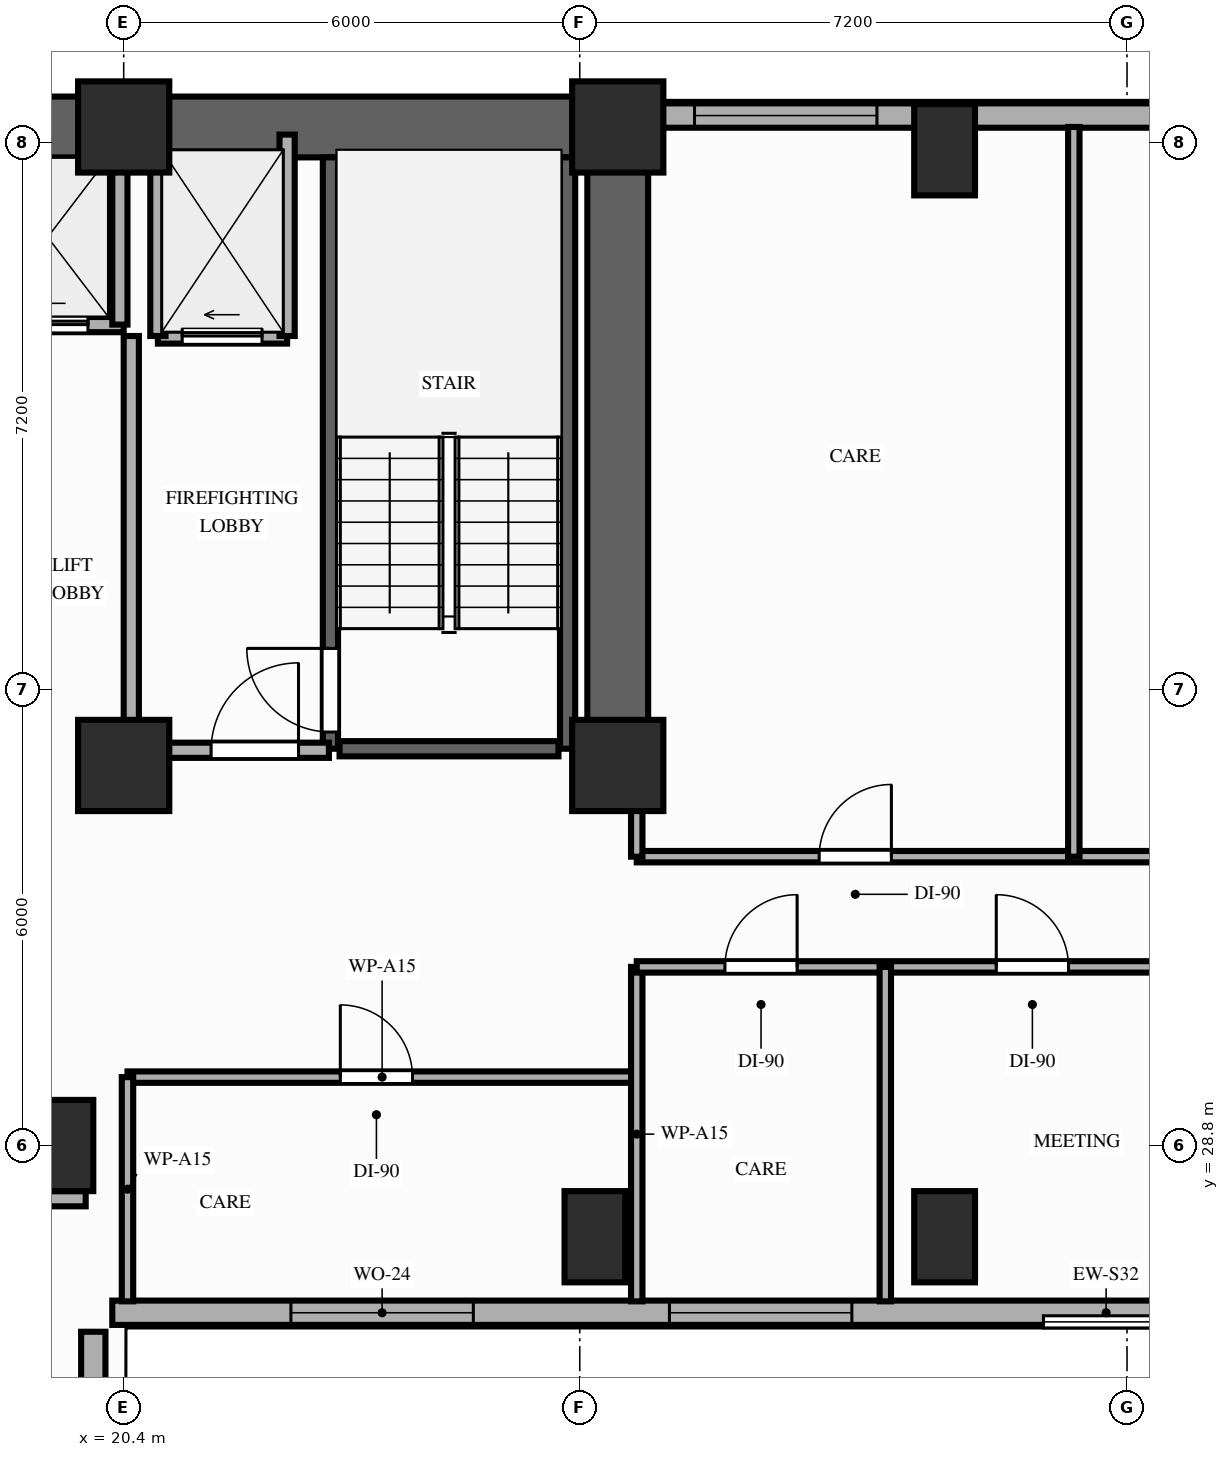
"""IFC4 building model, lengths in metres.
Left out: names, types, materials, properties, quantities, classifications, styles, units other than length and angle.
Written with IfcOpenShell. Run it as: python <this file> out.ifc"""

import sys

from ifc_helpers import new_model, si_unit, direction, frame, frame_2d, origin, origin_2d, place, context, subcontext, project, spatial, rectangle, extrude, element, fill, save


model = new_model("IFC4")
c1 = context("Model", 3, precision=1e-05, world=origin(), true_north=direction((0.0, 1.0)))
c2 = subcontext(c1, "Body", "Model", "MODEL_VIEW")
j1 = project(units=[si_unit("LENGTHUNIT", "METRE"), si_unit("PLANEANGLEUNIT", "RADIAN")], contexts=[c1])
p1 = place(None, origin())
s1 = spatial("IfcSite", under=j1, at=p1, CompositionType="ELEMENT")
p2 = place(p1, origin())
s2 = spatial("IfcBuilding", under=s1, at=p2, CompositionType="ELEMENT")
p3 = place(p2, frame((0.0, 0.0, 72.4)))
s3 = spatial("IfcBuildingStorey", under=s2, at=p3, CompositionType="ELEMENT", Elevation=72.4)
for number, where, z_axis, x_axis in (
    (1, (20.4, 33.8, 0.0), (0.0, 0.0, 1.0), (1.0, 0.0, 0.0)),
    (2, (26.9, 33.8, 0.0), (0.0, 0.0, 1.0), (1.0, 0.0, 0.0)),
    (3, (20.4, 42.2, 0.0), (0.0, 0.0, 1.0), (1.0, 0.0, 0.0)),
    (4, (26.9, 42.2, 0.0), (0.0, 0.0, 1.0), (1.0, 0.0, 0.0)),
):
    element("IfcColumn", number, at=place(p3, frame(where, z_axis=z_axis, x_axis=x_axis)), inside=s3, PredefinedType="COLUMN", context=c2, shape_type="SweptSolid", body=[
        extrude(rectangle(XDim=1.2, YDim=1.2, at=origin_2d()), origin(), (0.0, 0.0, 1.0), 3.2),
    ])
for number, where, z_axis, x_axis in (
    (5, (19.6, 28.8, 0.0), (0.0, 0.0, 1.0), (1.0, 0.0, 0.0)),
    (6, (26.6, 27.6, 0.0), (0.0, 0.0, 1.0), (1.0, 0.0, 0.0)),
    (7, (31.2, 27.6, 0.0), (0.0, 0.0, 1.0), (1.0, 0.0, 0.0)),
    (8, (31.2, 41.9, 0.0), (0.0, 0.0, 1.0), (1.0, 0.0, 0.0)),
):
    element("IfcColumn", number, at=place(p3, frame(where, z_axis=z_axis, x_axis=x_axis)), inside=s3, PredefinedType="COLUMN", context=c2, shape_type="SweptSolid", body=[
        extrude(rectangle(XDim=0.8, YDim=1.2, at=origin_2d()), origin(), (0.0, 0.0, 1.0), 3.2),
    ])
p4 = place(p3, frame((20.0, 8.8, 0.0), z_axis=(0.0, 0.0, 1.0), x_axis=(0.0, 1.0, 0.0)))
e9 = element("IfcWall", 9, at=p4, inside=s3, PredefinedType="STANDARD", context=c2, shape_type="SweptSolid", body=[
    extrude(rectangle(XDim=17.55, YDim=0.32, at=frame_2d((8.775, 0.0))), origin(), (0.0, 0.0, 1.0), 2.35),
])
p5 = place(p4, frame((10.7, 0.0, 0.85)))
e10 = element("IfcOpeningElement", 10, at=p5, cuts=e9, PredefinedType="OPENING", context=c2, shape_type="SweptSolid", body=[
    extrude(rectangle(XDim=2.4, YDim=1.25, at=frame_2d((1.2, 0.625))), frame((0.0, 0.17, 0.0), z_axis=(0.0, -1.0, 0.0), x_axis=(1.0, 0.0, 0.0)), (0.0, 0.0, 1.0), 0.34),
])
p6 = place(p3, frame((46.4, 42.35, 0.0), z_axis=(0.0, 0.0, 1.0), x_axis=(-1.0, 0.0, 0.0)))
e11 = element("IfcWall", 11, at=p6, inside=s3, PredefinedType="STANDARD", context=c2, shape_type="SweptSolid", body=[
    extrude(rectangle(XDim=19.05, YDim=0.32, at=frame_2d((9.525, 0.0))), origin(), (0.0, 0.0, 1.0), 2.35),
])
p7 = place(p6, frame((16.09, 0.0, 0.85)))
e12 = element("IfcOpeningElement", 12, at=p7, cuts=e11, PredefinedType="OPENING", context=c2, shape_type="SweptSolid", body=[
    extrude(rectangle(XDim=2.4, YDim=1.25, at=frame_2d((1.2, 0.625))), frame((0.0, 0.17, 0.0), z_axis=(0.0, -1.0, 0.0), x_axis=(1.0, 0.0, 0.0)), (0.0, 0.0, 1.0), 0.34),
])
p8 = place(p3, frame((20.25, 26.6, 0.0), z_axis=(0.0, 0.0, 1.0), x_axis=(1.0, 0.0, 0.0)))
e13 = element("IfcWall", 13, at=p8, inside=s3, PredefinedType="STANDARD", context=c2, shape_type="SweptSolid", body=[
    extrude(rectangle(XDim=26.15, YDim=0.32, at=frame_2d((13.075, 0.0))), origin(), (0.0, 0.0, 1.0), 2.96),
])
p9 = place(p8, frame((2.35, 0.0, 0.85)))
e14 = element("IfcOpeningElement", 14, at=p9, cuts=e13, PredefinedType="OPENING", context=c2, shape_type="SweptSolid", body=[
    extrude(rectangle(XDim=2.4, YDim=1.8, at=frame_2d((1.2, 0.9))), frame((0.0, 0.17, 0.0), z_axis=(0.0, -1.0, 0.0), x_axis=(1.0, 0.0, 0.0)), (0.0, 0.0, 1.0), 0.34),
])
p10 = place(p8, frame((7.33, 0.0, 0.85)))
e15 = element("IfcOpeningElement", 15, at=p10, cuts=e13, PredefinedType="OPENING", context=c2, shape_type="SweptSolid", body=[
    extrude(rectangle(XDim=2.4, YDim=1.8, at=frame_2d((1.2, 0.9))), frame((0.0, 0.17, 0.0), z_axis=(0.0, -1.0, 0.0), x_axis=(1.0, 0.0, 0.0)), (0.0, 0.0, 1.0), 0.34),
])
p11 = place(p3, frame((6.45, 42.2, 0.0), z_axis=(0.0, 0.0, 1.0), x_axis=(1.0, 0.0, 0.0)))
e16 = element("IfcWall", 16, at=p11, inside=s3, PredefinedType="SHEAR", context=c2, shape_type="SweptSolid", body=[
    extrude(rectangle(XDim=20.45, YDim=0.8, at=frame_2d((10.225, 0.0))), origin(), (0.0, 0.0, 1.0), 2.96),
])
p12 = place(p3, frame((26.9, 33.8, 0.0), z_axis=(0.0, 0.0, 1.0), x_axis=(0.0, 1.0, 0.0)))
e17 = element("IfcWall", 17, at=p12, inside=s3, PredefinedType="SHEAR", context=c2, shape_type="SweptSolid", body=[
    extrude(rectangle(XDim=7.95, YDim=0.8, at=frame_2d((3.975, 0.0))), origin(), (0.0, 0.0, 1.0), 2.96),
])
p13 = place(p3, frame((23.12, 34.02, 0.0), z_axis=(0.0, 0.0, 1.0), x_axis=(0.0, 1.0, 0.0)))
e18 = element("IfcWall", 18, at=p13, inside=s3, PredefinedType="SHEAR", context=c2, shape_type="SweptSolid", body=[
    extrude(rectangle(XDim=7.78, YDim=0.2, at=frame_2d((3.89, 0.0))), origin(), (0.0, 0.0, 1.0), 2.96),
])
p14 = place(p13, frame((0.22, 0.0, 0.0)))
e19 = element("IfcOpeningElement", 19, at=p14, cuts=e18, PredefinedType="OPENING", context=c2, shape_type="SweptSolid", body=[
    extrude(rectangle(XDim=1.1, YDim=2.15, at=frame_2d((0.55, 1.075))), frame((0.0, 0.11, 0.0), z_axis=(0.0, -1.0, 0.0), x_axis=(1.0, 0.0, 0.0)), (0.0, 0.0, 1.0), 0.22),
])
p15 = place(p3, frame((26.24, 34.02, 0.0), z_axis=(0.0, 0.0, 1.0), x_axis=(0.0, 1.0, 0.0)))
e20 = element("IfcWall", 20, at=p15, inside=s3, PredefinedType="SHEAR", context=c2, shape_type="SweptSolid", body=[
    extrude(rectangle(XDim=7.78, YDim=0.2, at=frame_2d((3.89, 0.0))), origin(), (0.0, 0.0, 1.0), 2.96),
])
p16 = place(p3, frame((23.24, 34.02, 0.0), z_axis=(0.0, 0.0, 1.0), x_axis=(1.0, 0.0, 0.0)))
e21 = element("IfcWall", 21, at=p16, inside=s3, PredefinedType="SHEAR", context=c2, shape_type="SweptSolid", body=[
    extrude(rectangle(XDim=2.88, YDim=0.2, at=frame_2d((1.44, 0.0))), origin(), (0.0, 0.0, 1.0), 2.96),
])
p17 = place(p3, frame((20.85, 39.45, 0.0), z_axis=(0.0, 0.0, 1.0), x_axis=(1.0, 0.0, 0.0)))
e22 = element("IfcWall", 22, at=p17, inside=s3, PredefinedType="MOVABLE", context=c2, shape_type="SweptSolid", body=[
    extrude(rectangle(XDim=1.7, YDim=0.2, at=frame_2d((0.85, 0.0))), origin(), (0.0, 0.0, 1.0), 2.96),
])
p18 = place(p17, frame((0.32, 0.0, 0.0)))
e23 = element("IfcOpeningElement", 23, at=p18, cuts=e22, PredefinedType="OPENING", context=c2, shape_type="SweptSolid", body=[
    extrude(rectangle(XDim=1.05, YDim=2.15, at=frame_2d((0.525, 1.075))), frame((0.0, 0.11, 0.0), z_axis=(0.0, -1.0, 0.0), x_axis=(1.0, 0.0, 0.0)), (0.0, 0.0, 1.0), 0.22),
])
for number, where, z_axis, x_axis in (
    (24, (20.85, 39.45, 0.0), (0.0, 0.0, 1.0), (0.0, 1.0, 0.0)),
    (25, (22.55, 39.45, 0.0), (0.0, 0.0, 1.0), (0.0, 1.0, 0.0)),
):
    element("IfcWall", number, at=place(p3, frame(where, z_axis=z_axis, x_axis=x_axis)), inside=s3, PredefinedType="MOVABLE", context=c2, shape_type="SweptSolid", body=[
        extrude(rectangle(XDim=2.65, YDim=0.2, at=frame_2d((1.325, 0.0))), origin(), (0.0, 0.0, 1.0), 2.35),
    ])
p19 = place(p3, frame((20.5, 34.0, 0.0), z_axis=(0.0, 0.0, 1.0), x_axis=(0.0, 1.0, 0.0)))
e26 = element("IfcWall", 26, at=p19, inside=s3, PredefinedType="PARTITIONING", context=c2, shape_type="SweptSolid", body=[
    extrude(rectangle(XDim=5.45, YDim=0.2, at=frame_2d((2.725, 0.0))), origin(), (0.0, 0.0, 1.0), 2.35),
])
p20 = place(p3, frame((20.5, 34.0, 0.0), z_axis=(0.0, 0.0, 1.0), x_axis=(1.0, 0.0, 0.0)))
e27 = element("IfcWall", 27, at=p20, inside=s3, PredefinedType="PARTITIONING", context=c2, shape_type="SweptSolid", body=[
    extrude(rectangle(XDim=2.6, YDim=0.2, at=frame_2d((1.3, 0.0))), origin(), (0.0, 0.0, 1.0), 2.35),
])
p21 = place(p20, frame((1.05, 0.0, 0.0)))
e28 = element("IfcOpeningElement", 28, at=p21, cuts=e27, PredefinedType="OPENING", context=c2, shape_type="SweptSolid", body=[
    extrude(rectangle(XDim=1.15, YDim=2.15, at=frame_2d((0.575, 1.075))), frame((0.0, 0.11, 0.0), z_axis=(0.0, -1.0, 0.0), x_axis=(1.0, 0.0, 0.0)), (0.0, 0.0, 1.0), 0.22),
])
p22 = place(p3, frame((13.0, 39.6, 0.0), z_axis=(0.0, 0.0, 1.0), x_axis=(1.0, 0.0, 0.0)))
e29 = element("IfcWall", 29, at=p22, inside=s3, PredefinedType="MOVABLE", context=c2, shape_type="SweptSolid", body=[
    extrude(rectangle(XDim=7.4, YDim=0.2, at=frame_2d((3.7, 0.0))), origin(), (0.0, 0.0, 1.0), 2.96),
])
p23 = place(p22, frame((0.47, 0.0, 0.0)))
e30 = element("IfcOpeningElement", 30, at=p23, cuts=e29, PredefinedType="OPENING", context=c2, shape_type="SweptSolid", body=[
    extrude(rectangle(XDim=1.05, YDim=2.15, at=frame_2d((0.525, 1.075))), frame((0.0, 0.11, 0.0), z_axis=(0.0, -1.0, 0.0), x_axis=(1.0, 0.0, 0.0)), (0.0, 0.0, 1.0), 0.22),
])
p24 = place(p22, frame((2.28, 0.0, 0.0)))
e31 = element("IfcOpeningElement", 31, at=p24, cuts=e29, PredefinedType="OPENING", context=c2, shape_type="SweptSolid", body=[
    extrude(rectangle(XDim=1.05, YDim=2.15, at=frame_2d((0.525, 1.075))), frame((0.0, 0.11, 0.0), z_axis=(0.0, -1.0, 0.0), x_axis=(1.0, 0.0, 0.0)), (0.0, 0.0, 1.0), 0.22),
])
p25 = place(p22, frame((4.08, 0.0, 0.0)))
e32 = element("IfcOpeningElement", 32, at=p25, cuts=e29, PredefinedType="OPENING", context=c2, shape_type="SweptSolid", body=[
    extrude(rectangle(XDim=1.05, YDim=2.15, at=frame_2d((0.525, 1.075))), frame((0.0, 0.11, 0.0), z_axis=(0.0, -1.0, 0.0), x_axis=(1.0, 0.0, 0.0)), (0.0, 0.0, 1.0), 0.22),
])
p26 = place(p22, frame((5.88, 0.0, 0.0)))
e33 = element("IfcOpeningElement", 33, at=p26, cuts=e29, PredefinedType="OPENING", context=c2, shape_type="SweptSolid", body=[
    extrude(rectangle(XDim=1.05, YDim=2.15, at=frame_2d((0.525, 1.075))), frame((0.0, 0.11, 0.0), z_axis=(0.0, -1.0, 0.0), x_axis=(1.0, 0.0, 0.0)), (0.0, 0.0, 1.0), 0.22),
])
p27 = place(p3, frame((20.35, 39.6, 0.0), z_axis=(0.0, 0.0, 1.0), x_axis=(0.0, 1.0, 0.0)))
e34 = element("IfcWall", 34, at=p27, inside=s3, PredefinedType="MOVABLE", context=c2, shape_type="SweptSolid", body=[
    extrude(rectangle(XDim=2.18, YDim=0.2, at=frame_2d((1.09, 0.0))), origin(), (0.0, 0.0, 1.0), 2.96),
])
p28 = place(p3, frame((9.06, 28.1, 0.0), z_axis=(0.0, 0.0, 1.0), x_axis=(1.0, 0.0, 0.0)))
e35 = element("IfcWall", 35, at=p28, inside=s3, PredefinedType="PARTITIONING", context=c2, shape_type="SweptSolid", body=[
    extrude(rectangle(XDim=10.84, YDim=0.2, at=frame_2d((5.42, 0.0))), origin(), (0.0, 0.0, 1.0), 2.35),
])
p29 = place(p3, frame((20.45, 29.7, 0.0), z_axis=(0.0, 0.0, 1.0), x_axis=(1.0, 0.0, 0.0)))
e36 = element("IfcWall", 36, at=p29, inside=s3, PredefinedType="PARTITIONING", context=c2, shape_type="SweptSolid", body=[
    extrude(rectangle(XDim=6.7, YDim=0.15, at=frame_2d((3.35, 0.0))), origin(), (0.0, 0.0, 1.0), 2.96),
])
p30 = place(p29, frame((2.8, 0.0, 0.0)))
e37 = element("IfcOpeningElement", 37, at=p30, cuts=e36, PredefinedType="OPENING", context=c2, shape_type="SweptSolid", body=[
    extrude(rectangle(XDim=0.95, YDim=2.15, at=frame_2d((0.475, 1.075))), frame((0.0, 0.085, 0.0), z_axis=(0.0, -1.0, 0.0), x_axis=(1.0, 0.0, 0.0)), (0.0, 0.0, 1.0), 0.17),
])
p31 = place(p3, frame((20.45, 26.75, 0.0), z_axis=(0.0, 0.0, 1.0), x_axis=(0.0, 1.0, 0.0)))
e38 = element("IfcWall", 38, at=p31, inside=s3, PredefinedType="PARTITIONING", context=c2, shape_type="SweptSolid", body=[
    extrude(rectangle(XDim=2.95, YDim=0.15, at=frame_2d((1.475, 0.0))), origin(), (0.0, 0.0, 1.0), 2.35),
])
p32 = place(p3, frame((27.15, 26.75, 0.0), z_axis=(0.0, 0.0, 1.0), x_axis=(0.0, 1.0, 0.0)))
e39 = element("IfcWall", 39, at=p32, inside=s3, PredefinedType="PARTITIONING", context=c2, shape_type="SweptSolid", body=[
    extrude(rectangle(XDim=4.4, YDim=0.15, at=frame_2d((2.2, 0.0))), origin(), (0.0, 0.0, 1.0), 2.35),
])
p33 = place(p3, frame((27.15, 31.15, 0.0), z_axis=(0.0, 0.0, 1.0), x_axis=(1.0, 0.0, 0.0)))
e40 = element("IfcWall", 40, at=p33, inside=s3, PredefinedType="PARTITIONING", context=c2, shape_type="SweptSolid", body=[
    extrude(rectangle(XDim=15.55, YDim=0.15, at=frame_2d((7.775, 0.0))), origin(), (0.0, 0.0, 1.0), 2.35),
])
p34 = place(p33, frame((1.16, 0.0, 0.0)))
e41 = element("IfcOpeningElement", 41, at=p34, cuts=e40, PredefinedType="OPENING", context=c2, shape_type="SweptSolid", body=[
    extrude(rectangle(XDim=0.95, YDim=2.15, at=frame_2d((0.475, 1.075))), frame((0.0, 0.085, 0.0), z_axis=(0.0, -1.0, 0.0), x_axis=(1.0, 0.0, 0.0)), (0.0, 0.0, 1.0), 0.17),
])
p35 = place(p33, frame((4.73, 0.0, 0.0)))
e42 = element("IfcOpeningElement", 42, at=p35, cuts=e40, PredefinedType="OPENING", context=c2, shape_type="SweptSolid", body=[
    extrude(rectangle(XDim=0.95, YDim=2.15, at=frame_2d((0.475, 1.075))), frame((0.0, 0.085, 0.0), z_axis=(0.0, -1.0, 0.0), x_axis=(1.0, 0.0, 0.0)), (0.0, 0.0, 1.0), 0.17),
])
p36 = place(p33, frame((8.93, 0.0, 0.0)))
e43 = element("IfcOpeningElement", 43, at=p36, cuts=e40, PredefinedType="OPENING", context=c2, shape_type="SweptSolid", body=[
    extrude(rectangle(XDim=0.95, YDim=2.15, at=frame_2d((0.475, 1.075))), frame((0.0, 0.085, 0.0), z_axis=(0.0, -1.0, 0.0), x_axis=(1.0, 0.0, 0.0)), (0.0, 0.0, 1.0), 0.17),
])
p37 = place(p33, frame((13.13, 0.0, 0.0)))
e44 = element("IfcOpeningElement", 44, at=p37, cuts=e40, PredefinedType="OPENING", context=c2, shape_type="SweptSolid", body=[
    extrude(rectangle(XDim=0.95, YDim=2.15, at=frame_2d((0.475, 1.075))), frame((0.0, 0.085, 0.0), z_axis=(0.0, -1.0, 0.0), x_axis=(1.0, 0.0, 0.0)), (0.0, 0.0, 1.0), 0.17),
])
p38 = place(p3, frame((27.15, 32.6, 0.0), z_axis=(0.0, 0.0, 1.0), x_axis=(1.0, 0.0, 0.0)))
e45 = element("IfcWall", 45, at=p38, inside=s3, PredefinedType="PARTITIONING", context=c2, shape_type="SweptSolid", body=[
    extrude(rectangle(XDim=15.55, YDim=0.15, at=frame_2d((7.775, 0.0))), origin(), (0.0, 0.0, 1.0), 2.35),
])
p39 = place(p38, frame((2.4, 0.0, 0.0)))
e46 = element("IfcOpeningElement", 46, at=p39, cuts=e45, PredefinedType="OPENING", context=c2, shape_type="SweptSolid", body=[
    extrude(rectangle(XDim=0.95, YDim=2.15, at=frame_2d((0.475, 1.075))), frame((0.0, 0.085, 0.0), z_axis=(0.0, -1.0, 0.0), x_axis=(1.0, 0.0, 0.0)), (0.0, 0.0, 1.0), 0.17),
])
p40 = place(p38, frame((10.17, 0.0, 0.0)))
e47 = element("IfcOpeningElement", 47, at=p40, cuts=e45, PredefinedType="OPENING", context=c2, shape_type="SweptSolid", body=[
    extrude(rectangle(XDim=0.95, YDim=2.15, at=frame_2d((0.475, 1.075))), frame((0.0, 0.085, 0.0), z_axis=(0.0, -1.0, 0.0), x_axis=(1.0, 0.0, 0.0)), (0.0, 0.0, 1.0), 0.17),
])
p41 = place(p3, frame((27.15, 32.6, 0.0), z_axis=(0.0, 0.0, 1.0), x_axis=(0.0, 1.0, 0.0)))
e48 = element("IfcWall", 48, at=p41, inside=s3, PredefinedType="PARTITIONING", context=c2, shape_type="SweptSolid", body=[
    extrude(rectangle(XDim=1.08, YDim=0.15, at=frame_2d((0.54, 0.0))), origin(), (0.0, 0.0, 1.0), 2.35),
])
p42 = place(p3, frame((30.42, 26.75, 0.0), z_axis=(0.0, 0.0, 1.0), x_axis=(0.0, 1.0, 0.0)))
e49 = element("IfcWall", 49, at=p42, inside=s3, PredefinedType="PARTITIONING", context=c2, shape_type="SweptSolid", body=[
    extrude(rectangle(XDim=4.4, YDim=0.15, at=frame_2d((2.2, 0.0))), origin(), (0.0, 0.0, 1.0), 2.35),
])
p43 = place(p3, frame((32.9, 32.6, 0.0), z_axis=(0.0, 0.0, 1.0), x_axis=(0.0, 1.0, 0.0)))
e50 = element("IfcWall", 50, at=p43, inside=s3, PredefinedType="PARTITIONING", context=c2, shape_type="SweptSolid", body=[
    extrude(rectangle(XDim=9.6, YDim=0.15, at=frame_2d((4.8, 0.0))), origin(), (0.0, 0.0, 1.0), 2.35),
])
p44 = place(p9, origin())
e51 = element("IfcWindow", 51, at=p44, inside=s3, PartitioningType="SINGLE_PANEL", PredefinedType="WINDOW", context=c2, shape_type="SweptSolid", body=[
    extrude(rectangle(XDim=2.4, YDim=1.8, at=frame_2d((1.2, 0.9))), frame((0.0, 0.03, 0.0), z_axis=(0.0, -1.0, 0.0), x_axis=(1.0, 0.0, 0.0)), (0.0, 0.0, 1.0), 0.06),
])
fill(e14, e51)
p45 = place(p10, origin())
e52 = element("IfcWindow", 52, at=p45, inside=s3, PartitioningType="SINGLE_PANEL", PredefinedType="WINDOW", context=c2, shape_type="SweptSolid", body=[
    extrude(rectangle(XDim=2.4, YDim=1.8, at=frame_2d((1.2, 0.9))), frame((0.0, 0.03, 0.0), z_axis=(0.0, -1.0, 0.0), x_axis=(1.0, 0.0, 0.0)), (0.0, 0.0, 1.0), 0.06),
])
fill(e15, e52)
p46 = place(p7, origin())
e53 = element("IfcWindow", 53, at=p46, inside=s3, PartitioningType="SINGLE_PANEL", PredefinedType="WINDOW", context=c2, shape_type="SweptSolid", body=[
    extrude(rectangle(XDim=2.4, YDim=1.25, at=frame_2d((1.2, 0.625))), frame((0.0, 0.03, 0.0), z_axis=(0.0, -1.0, 0.0), x_axis=(1.0, 0.0, 0.0)), (0.0, 0.0, 1.0), 0.06),
])
fill(e12, e53)
p47 = place(p14, origin())
e54 = element("IfcDoor", 54, at=p47, inside=s3, OperationType="SINGLE_SWING_RIGHT", PredefinedType="DOOR", context=c2, shape_type="SweptSolid", body=[
    extrude(rectangle(XDim=1.1, YDim=2.15, at=frame_2d((0.55, 1.075))), frame((0.0, 0.025, 0.0), z_axis=(0.0, -1.0, 0.0), x_axis=(1.0, 0.0, 0.0)), (0.0, 0.0, 1.0), 0.05),
])
fill(e19, e54)
p48 = place(p18, origin())
e55 = element("IfcDoor", 55, at=p48, inside=s3, OperationType="SLIDING_TO_LEFT", PredefinedType="DOOR", context=c2, shape_type="SweptSolid", body=[
    extrude(rectangle(XDim=1.05, YDim=2.15, at=frame_2d((0.525, 1.075))), frame((0.0, 0.025, 0.0), z_axis=(0.0, -1.0, 0.0), x_axis=(1.0, 0.0, 0.0)), (0.0, 0.0, 1.0), 0.05),
])
fill(e23, e55)
p49 = place(p21, origin())
e56 = element("IfcDoor", 56, at=p49, inside=s3, OperationType="SINGLE_SWING_RIGHT", PredefinedType="DOOR", context=c2, shape_type="SweptSolid", body=[
    extrude(rectangle(XDim=1.15, YDim=2.15, at=frame_2d((0.575, 1.075))), frame((0.0, 0.025, 0.0), z_axis=(0.0, -1.0, 0.0), x_axis=(1.0, 0.0, 0.0)), (0.0, 0.0, 1.0), 0.05),
])
fill(e28, e56)
p50 = place(p26, origin())
e57 = element("IfcDoor", 57, at=p50, inside=s3, OperationType="SLIDING_TO_LEFT", PredefinedType="DOOR", context=c2, shape_type="SweptSolid", body=[
    extrude(rectangle(XDim=1.05, YDim=2.15, at=frame_2d((0.525, 1.075))), frame((0.0, 0.025, 0.0), z_axis=(0.0, -1.0, 0.0), x_axis=(1.0, 0.0, 0.0)), (0.0, 0.0, 1.0), 0.05),
])
fill(e33, e57)
p51 = place(p30, origin())
e58 = element("IfcDoor", 58, at=p51, inside=s3, OperationType="SINGLE_SWING_LEFT", PredefinedType="DOOR", context=c2, shape_type="SweptSolid", body=[
    extrude(rectangle(XDim=0.95, YDim=2.15, at=frame_2d((0.475, 1.075))), frame((0.0, 0.025, 0.0), z_axis=(0.0, -1.0, 0.0), x_axis=(1.0, 0.0, 0.0)), (0.0, 0.0, 1.0), 0.05),
])
fill(e37, e58)
p52 = place(p34, origin())
e59 = element("IfcDoor", 59, at=p52, inside=s3, OperationType="SINGLE_SWING_RIGHT", PredefinedType="DOOR", context=c2, shape_type="SweptSolid", body=[
    extrude(rectangle(XDim=0.95, YDim=2.15, at=frame_2d((0.475, 1.075))), frame((0.0, 0.025, 0.0), z_axis=(0.0, -1.0, 0.0), x_axis=(1.0, 0.0, 0.0)), (0.0, 0.0, 1.0), 0.05),
])
fill(e41, e59)
p53 = place(p35, origin())
e60 = element("IfcDoor", 60, at=p53, inside=s3, OperationType="SINGLE_SWING_LEFT", PredefinedType="DOOR", context=c2, shape_type="SweptSolid", body=[
    extrude(rectangle(XDim=0.95, YDim=2.15, at=frame_2d((0.475, 1.075))), frame((0.0, 0.025, 0.0), z_axis=(0.0, -1.0, 0.0), x_axis=(1.0, 0.0, 0.0)), (0.0, 0.0, 1.0), 0.05),
])
fill(e42, e60)
p54 = place(p39, origin())
e61 = element("IfcDoor", 61, at=p54, inside=s3, OperationType="SINGLE_SWING_RIGHT", PredefinedType="DOOR", context=c2, shape_type="SweptSolid", body=[
    extrude(rectangle(XDim=0.95, YDim=2.15, at=frame_2d((0.475, 1.075))), frame((0.0, 0.025, 0.0), z_axis=(0.0, -1.0, 0.0), x_axis=(1.0, 0.0, 0.0)), (0.0, 0.0, 1.0), 0.05),
])
fill(e46, e61)
save(model, sys.argv[1])
